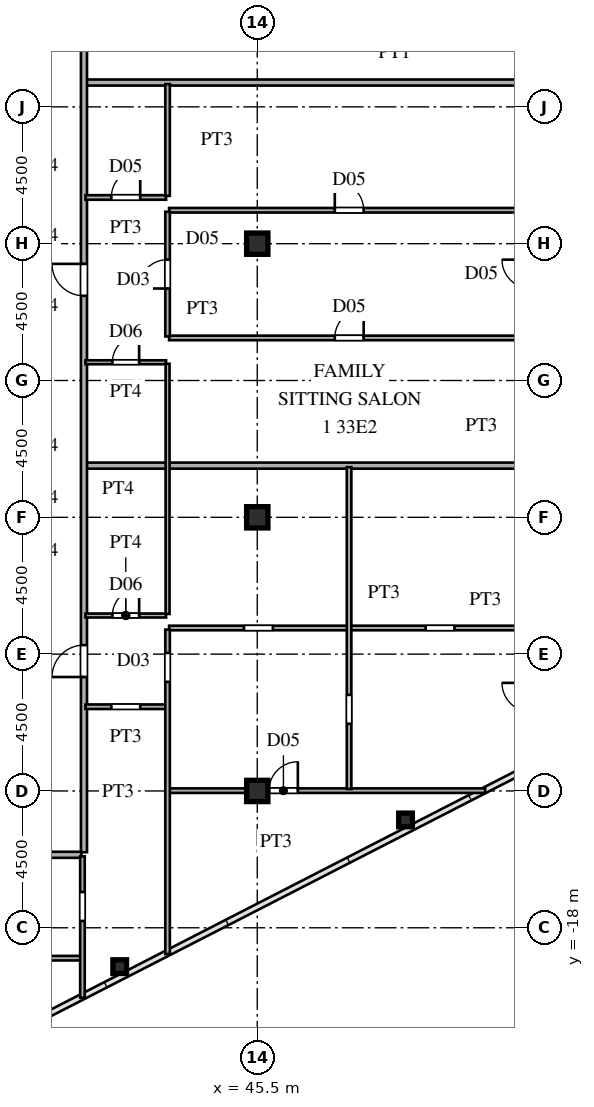
"""IFC4 building model, lengths in metres.
Left out: names, types, materials, properties, quantities, classifications, styles, units other than length and angle.
Written with IfcOpenShell. Run it as: python <this file> out.ifc"""

import sys

from ifc_helpers import new_model, si_unit, direction, frame, frame_2d, origin, origin_2d, place, context, subcontext, project, spatial, rectangle, hollow_rectangle, i_section, extrude, source, transform, mapped, element, fill, save


model = new_model("IFC4")
c1 = context("Model", 3, precision=1e-05, world=origin(), true_north=direction((0.0, 1.0)))
c2 = subcontext(c1, "Body", "Model", "MODEL_VIEW")
j1 = project(units=[si_unit("LENGTHUNIT", "METRE"), si_unit("PLANEANGLEUNIT", "RADIAN")], contexts=[c1])
p1 = place(None, origin())
s1 = spatial("IfcSite", under=j1, at=p1, CompositionType="ELEMENT")
p2 = place(p1, origin())
s2 = spatial("IfcBuilding", under=s1, at=p2, CompositionType="ELEMENT")
p3 = place(p2, frame((0.0, 0.0, 124.8)))
s3 = spatial("IfcBuildingStorey", under=s2, at=p3, CompositionType="ELEMENT", Elevation=124.8)
m1 = source(origin(), c2, "Body", "SweptSolid", [
    extrude(i_section(OverallWidth=0.7, OverallDepth=0.7, WebThickness=0.028, FlangeThickness=0.045, at=origin_2d()), origin(), (0.0, 0.0, 1.0), 3.6),
])
for number, where, z_axis, x_axis in (
    (1, (45.5, -13.5, 0.0), (0.0, 0.0, 1.0), (1.0, 0.0, 0.0)),
    (2, (45.5, -4.5, 0.0), (0.0, 0.0, 1.0), (1.0, 0.0, 0.0)),
    (3, (45.5, 4.5, 0.0), (0.0, 0.0, 1.0), (1.0, 0.0, 0.0)),
):
    element("IfcColumn", number, at=place(p3, frame(where, z_axis=z_axis, x_axis=x_axis)), inside=s3, PredefinedType="COLUMN", context=c2, shape_type="MappedRepresentation", body=[
        mapped(m1, transform((0.0, 0.0, 0.0), scale=1.0)),
    ])
m2 = source(origin(), c2, "Body", "SweptSolid", [
    extrude(hollow_rectangle(XDim=0.45, YDim=0.45, WallThickness=0.018, at=origin_2d()), origin(), (0.0, 0.0, 1.0), 3.6),
])
for number, where, z_axis, x_axis in (
    (4, (40.976, -19.278, 0.0), (0.0, 0.0, 1.0), (1.0, 0.0, 0.0)),
    (5, (50.377, -14.453, 0.0), (0.0, 0.0, 1.0), (1.0, 0.0, 0.0)),
):
    element("IfcColumn", number, at=place(p3, frame(where, z_axis=z_axis, x_axis=x_axis)), inside=s3, PredefinedType="COLUMN", context=c2, shape_type="MappedRepresentation", body=[
        mapped(m2, transform((0.0, 0.0, 0.0), scale=1.0)),
    ])
p4 = place(p3, frame((27.465, -19.0, 0.0), z_axis=(0.0, 0.0, 1.0), x_axis=(1.0, 0.0, 0.0)))
e6 = element("IfcWall", 6, at=p4, inside=s3, PredefinedType="PARTITIONING", context=c2, shape_type="SweptSolid", body=[
    extrude(rectangle(XDim=12.235, YDim=0.15, at=frame_2d((6.117, 0.0))), origin(), (0.0, 0.0, 1.0), 3.38),
])
p5 = place(p4, frame((5.685, 0.0, 0.0)))
e7 = element("IfcOpeningElement", 7, at=p5, cuts=e6, PredefinedType="OPENING", context=c2, shape_type="SweptSolid", body=[
    extrude(rectangle(XDim=0.95, YDim=2.15, at=frame_2d((0.475, 1.075))), frame((0.0, 0.085, 0.0), z_axis=(0.0, -1.0, 0.0), x_axis=(1.0, 0.0, 0.0)), (0.0, 0.0, 1.0), 0.17),
])
p6 = place(p3, frame((36.585, -15.6, 0.0), z_axis=(0.0, 0.0, 1.0), x_axis=(1.0, 0.0, 0.0)))
e8 = element("IfcWall", 8, at=p6, inside=s3, PredefinedType="PARTITIONING", context=c2, shape_type="SweptSolid", body=[
    extrude(rectangle(XDim=3.13, YDim=0.2, at=frame_2d((1.565, 0.0))), origin(), (0.0, 0.0, 1.0), 3.38),
])
p7 = place(p3, frame((42.6, -13.49, 0.0), z_axis=(0.0, 0.0, 1.0), x_axis=(1.0, 0.0, 0.0)))
e9 = element("IfcWall", 9, at=p7, inside=s3, PredefinedType="PARTITIONING", context=c2, shape_type="SweptSolid", body=[
    extrude(rectangle(XDim=10.397, YDim=0.15, at=frame_2d((5.198, 0.0))), origin(), (0.0, 0.0, 1.0), 2.78),
])
p8 = place(p7, frame((3.285, 0.0, 0.0)))
e10 = element("IfcOpeningElement", 10, at=p8, cuts=e9, PredefinedType="OPENING", context=c2, shape_type="SweptSolid", body=[
    extrude(rectangle(XDim=0.95, YDim=2.15, at=frame_2d((0.475, 1.075))), frame((0.0, 0.085, 0.0), z_axis=(0.0, -1.0, 0.0), x_axis=(1.0, 0.0, 0.0)), (0.0, 0.0, 1.0), 0.17),
])
p9 = place(p3, frame((39.85, -10.73, 0.0), z_axis=(0.0, 0.0, 1.0), x_axis=(1.0, 0.0, 0.0)))
e11 = element("IfcWall", 11, at=p9, inside=s3, PredefinedType="PARTITIONING", context=c2, shape_type="SweptSolid", body=[
    extrude(rectangle(XDim=2.65, YDim=0.15, at=frame_2d((1.325, 0.0))), origin(), (0.0, 0.0, 1.0), 3.38),
])
p10 = place(p9, frame((0.85, 0.0, 0.0)))
e12 = element("IfcOpeningElement", 12, at=p10, cuts=e11, PredefinedType="OPENING", context=c2, shape_type="SweptSolid", body=[
    extrude(rectangle(XDim=0.95, YDim=2.15, at=frame_2d((0.475, 1.075))), frame((0.0, 0.085, 0.0), z_axis=(0.0, -1.0, 0.0), x_axis=(1.0, 0.0, 0.0)), (0.0, 0.0, 1.0), 0.17),
])
p11 = place(p3, frame((42.6, -8.14, 0.0), z_axis=(0.0, 0.0, 1.0), x_axis=(1.0, 0.0, 0.0)))
e13 = element("IfcWall", 13, at=p11, inside=s3, PredefinedType="PARTITIONING", context=c2, shape_type="SweptSolid", body=[
    extrude(rectangle(XDim=20.81, YDim=0.15, at=frame_2d((10.405, 0.0))), origin(), (0.0, 0.0, 1.0), 3.38),
])
p12 = place(p11, frame((2.462, 0.0, 0.0)))
e14 = element("IfcOpeningElement", 14, at=p12, cuts=e13, PredefinedType="OPENING", context=c2, shape_type="SweptSolid", body=[
    extrude(rectangle(XDim=0.95, YDim=2.15, at=frame_2d((0.475, 1.075))), frame((0.0, 0.085, 0.0), z_axis=(0.0, -1.0, 0.0), x_axis=(1.0, 0.0, 0.0)), (0.0, 0.0, 1.0), 0.17),
])
p13 = place(p11, frame((8.438, 0.0, 0.0)))
e15 = element("IfcOpeningElement", 15, at=p13, cuts=e13, PredefinedType="OPENING", context=c2, shape_type="SweptSolid", body=[
    extrude(rectangle(XDim=0.95, YDim=2.15, at=frame_2d((0.475, 1.075))), frame((0.0, 0.085, 0.0), z_axis=(0.0, -1.0, 0.0), x_axis=(1.0, 0.0, 0.0)), (0.0, 0.0, 1.0), 0.17),
])
p14 = place(p3, frame((39.85, -7.73, 0.0), z_axis=(0.0, 0.0, 1.0), x_axis=(1.0, 0.0, 0.0)))
e16 = element("IfcWall", 16, at=p14, inside=s3, PredefinedType="PARTITIONING", context=c2, shape_type="SweptSolid", body=[
    extrude(rectangle(XDim=2.65, YDim=0.13, at=frame_2d((1.325, 0.0))), origin(), (0.0, 0.0, 1.0), 3.38),
])
p15 = place(p14, frame((0.885, 0.0, 0.0)))
e17 = element("IfcOpeningElement", 17, at=p15, cuts=e16, PredefinedType="OPENING", context=c2, shape_type="SweptSolid", body=[
    extrude(rectangle(XDim=0.88, YDim=2.1, at=frame_2d((0.44, 1.05))), frame((0.0, 0.075, 0.0), z_axis=(0.0, -1.0, 0.0), x_axis=(1.0, 0.0, 0.0)), (0.0, 0.0, 1.0), 0.15),
])
p16 = place(p3, frame((39.88, -2.8, 0.0), z_axis=(0.0, 0.0, 1.0), x_axis=(1.0, 0.0, 0.0)))
e18 = element("IfcWall", 18, at=p16, inside=s3, PredefinedType="PARTITIONING", context=c2, shape_type="SweptSolid", body=[
    extrude(rectangle(XDim=29.625, YDim=0.2, at=frame_2d((14.812, 0.0))), origin(), (0.0, 0.0, 1.0), 3.38),
])
p17 = place(p3, frame((39.85, 0.6, 0.0), z_axis=(0.0, 0.0, 1.0), x_axis=(1.0, 0.0, 0.0)))
e19 = element("IfcWall", 19, at=p17, inside=s3, PredefinedType="PARTITIONING", context=c2, shape_type="SweptSolid", body=[
    extrude(rectangle(XDim=2.65, YDim=0.13, at=frame_2d((1.325, 0.0))), origin(), (0.0, 0.0, 1.0), 3.38),
])
p18 = place(p17, frame((0.885, 0.0, 0.0)))
e20 = element("IfcOpeningElement", 20, at=p18, cuts=e19, PredefinedType="OPENING", context=c2, shape_type="SweptSolid", body=[
    extrude(rectangle(XDim=0.88, YDim=2.1, at=frame_2d((0.44, 1.05))), frame((0.0, 0.075, 0.0), z_axis=(0.0, -1.0, 0.0), x_axis=(1.0, 0.0, 0.0)), (0.0, 0.0, 1.0), 0.15),
])
p19 = place(p3, frame((42.6, 1.4, 0.0), z_axis=(0.0, 0.0, 1.0), x_axis=(1.0, 0.0, 0.0)))
e21 = element("IfcWall", 21, at=p19, inside=s3, PredefinedType="PARTITIONING", context=c2, shape_type="SweptSolid", body=[
    extrude(rectangle(XDim=26.935, YDim=0.15, at=frame_2d((13.467, 0.0))), origin(), (0.0, 0.0, 1.0), 3.38),
])
p20 = place(p19, frame((5.45, 0.0, 0.0)))
e22 = element("IfcOpeningElement", 22, at=p20, cuts=e21, PredefinedType="OPENING", context=c2, shape_type="SweptSolid", body=[
    extrude(rectangle(XDim=0.95, YDim=2.15, at=frame_2d((0.475, 1.075))), frame((0.0, 0.085, 0.0), z_axis=(0.0, -1.0, 0.0), x_axis=(1.0, 0.0, 0.0)), (0.0, 0.0, 1.0), 0.17),
])
p21 = place(p19, frame((14.275, 0.0, 0.0)))
e23 = element("IfcOpeningElement", 23, at=p21, cuts=e21, PredefinedType="OPENING", context=c2, shape_type="SweptSolid", body=[
    extrude(rectangle(XDim=0.95, YDim=2.15, at=frame_2d((0.475, 1.075))), frame((0.0, 0.085, 0.0), z_axis=(0.0, -1.0, 0.0), x_axis=(1.0, 0.0, 0.0)), (0.0, 0.0, 1.0), 0.17),
])
p22 = place(p3, frame((42.6, 5.6, 0.0), z_axis=(0.0, 0.0, 1.0), x_axis=(1.0, 0.0, 0.0)))
e24 = element("IfcWall", 24, at=p22, inside=s3, PredefinedType="PARTITIONING", context=c2, shape_type="SweptSolid", body=[
    extrude(rectangle(XDim=25.766, YDim=0.15, at=frame_2d((12.883, 0.0))), origin(), (0.0, 0.0, 1.0), 3.38),
])
p23 = place(p22, frame((5.45, 0.0, 0.0)))
e25 = element("IfcOpeningElement", 25, at=p23, cuts=e24, PredefinedType="OPENING", context=c2, shape_type="SweptSolid", body=[
    extrude(rectangle(XDim=0.95, YDim=2.15, at=frame_2d((0.475, 1.075))), frame((0.0, 0.085, 0.0), z_axis=(0.0, -1.0, 0.0), x_axis=(1.0, 0.0, 0.0)), (0.0, 0.0, 1.0), 0.17),
])
p24 = place(p22, frame((14.275, 0.0, 0.0)))
e26 = element("IfcOpeningElement", 26, at=p24, cuts=e24, PredefinedType="OPENING", context=c2, shape_type="SweptSolid", body=[
    extrude(rectangle(XDim=0.95, YDim=2.15, at=frame_2d((0.475, 1.075))), frame((0.0, 0.085, 0.0), z_axis=(0.0, -1.0, 0.0), x_axis=(1.0, 0.0, 0.0)), (0.0, 0.0, 1.0), 0.17),
])
p25 = place(p3, frame((39.85, 6.02, 0.0), z_axis=(0.0, 0.0, 1.0), x_axis=(1.0, 0.0, 0.0)))
e27 = element("IfcWall", 27, at=p25, inside=s3, PredefinedType="PARTITIONING", context=c2, shape_type="SweptSolid", body=[
    extrude(rectangle(XDim=2.65, YDim=0.15, at=frame_2d((1.325, 0.0))), origin(), (0.0, 0.0, 1.0), 3.38),
])
p26 = place(p25, frame((0.85, 0.0, 0.0)))
e28 = element("IfcOpeningElement", 28, at=p26, cuts=e27, PredefinedType="OPENING", context=c2, shape_type="SweptSolid", body=[
    extrude(rectangle(XDim=0.95, YDim=2.15, at=frame_2d((0.475, 1.075))), frame((0.0, 0.085, 0.0), z_axis=(0.0, -1.0, 0.0), x_axis=(1.0, 0.0, 0.0)), (0.0, 0.0, 1.0), 0.17),
])
p27 = place(p3, frame((39.88, 9.8, 0.0), z_axis=(0.0, 0.0, 1.0), x_axis=(1.0, 0.0, 0.0)))
e29 = element("IfcWall", 29, at=p27, inside=s3, PredefinedType="PARTITIONING", context=c2, shape_type="SweptSolid", body=[
    extrude(rectangle(XDim=20.277, YDim=0.2, at=frame_2d((10.139, 0.0))), origin(), (0.0, 0.0, 1.0), 3.38),
])
p28 = place(p3, frame((39.75, -20.301, 0.0), z_axis=(0.0, 0.0, 1.0), x_axis=(0.0, 1.0, 0.0)))
e30 = element("IfcWall", 30, at=p28, inside=s3, PredefinedType="PARTITIONING", context=c2, shape_type="SweptSolid", body=[
    extrude(rectangle(XDim=4.651, YDim=0.15, at=frame_2d((2.326, 0.0))), origin(), (0.0, 0.0, 1.0), 3.38),
])
p29 = place(p28, frame((2.526, 0.0, 0.0)))
e31 = element("IfcOpeningElement", 31, at=p29, cuts=e30, PredefinedType="OPENING", context=c2, shape_type="SweptSolid", body=[
    extrude(rectangle(XDim=0.95, YDim=2.15, at=frame_2d((0.475, 1.075))), frame((0.0, 0.085, 0.0), z_axis=(0.0, -1.0, 0.0), x_axis=(1.0, 0.0, 0.0)), (0.0, 0.0, 1.0), 0.17),
])
p30 = place(p3, frame((39.8, -15.515, 0.0), z_axis=(0.0, 0.0, 1.0), x_axis=(0.0, 1.0, 0.0)))
e32 = element("IfcWall", 32, at=p30, inside=s3, PredefinedType="PARTITIONING", context=c2, shape_type="SweptSolid", body=[
    extrude(rectangle(XDim=31.03, YDim=0.2, at=frame_2d((15.515, 0.0))), origin(), (0.0, 0.0, 1.0), 3.38),
])
p31 = place(p30, frame((5.762, 0.0, 0.0)))
e33 = element("IfcOpeningElement", 33, at=p31, cuts=e32, PredefinedType="OPENING", context=c2, shape_type="SweptSolid", body=[
    extrude(rectangle(XDim=1.05, YDim=2.25, at=frame_2d((0.525, 1.125))), frame((0.0, 0.11, 0.0), z_axis=(0.0, -1.0, 0.0), x_axis=(1.0, 0.0, 0.0)), (0.0, 0.0, 1.0), 0.22),
])
p32 = place(p30, frame((18.301, 0.0, 0.0)))
e34 = element("IfcOpeningElement", 34, at=p32, cuts=e32, PredefinedType="OPENING", context=c2, shape_type="SweptSolid", body=[
    extrude(rectangle(XDim=1.05, YDim=2.25, at=frame_2d((0.525, 1.125))), frame((0.0, 0.11, 0.0), z_axis=(0.0, -1.0, 0.0), x_axis=(1.0, 0.0, 0.0)), (0.0, 0.0, 1.0), 0.22),
])
p33 = place(p30, frame((27.69, 0.0, 0.0)))
e35 = element("IfcOpeningElement", 35, at=p33, cuts=e32, PredefinedType="OPENING", context=c2, shape_type="SweptSolid", body=[
    extrude(rectangle(XDim=1.05, YDim=2.25, at=frame_2d((0.525, 1.125))), frame((0.0, 0.11, 0.0), z_axis=(0.0, -1.0, 0.0), x_axis=(1.0, 0.0, 0.0)), (0.0, 0.0, 1.0), 0.22),
])
p34 = place(p3, frame((42.55, -18.865, 0.0), z_axis=(0.0, 0.0, 1.0), x_axis=(0.0, 1.0, 0.0)))
e36 = element("IfcWall", 36, at=p34, inside=s3, PredefinedType="PARTITIONING", context=c2, shape_type="SweptSolid", body=[
    extrude(rectangle(XDim=10.672, YDim=0.15, at=frame_2d((5.336, 0.0))), origin(), (0.0, 0.0, 1.0), 3.38),
])
p35 = place(p34, frame((8.955, 0.0, 0.0)))
e37 = element("IfcOpeningElement", 37, at=p35, cuts=e36, PredefinedType="OPENING", context=c2, shape_type="SweptSolid", body=[
    extrude(rectangle(XDim=0.95, YDim=2.15, at=frame_2d((0.475, 1.075))), frame((0.0, 0.085, 0.0), z_axis=(0.0, -1.0, 0.0), x_axis=(1.0, 0.0, 0.0)), (0.0, 0.0, 1.0), 0.17),
])
p36 = place(p3, frame((42.55, -7.678, 0.0), z_axis=(0.0, 0.0, 1.0), x_axis=(0.0, 1.0, 0.0)))
e38 = element("IfcWall", 38, at=p36, inside=s3, PredefinedType="PARTITIONING", context=c2, shape_type="SweptSolid", body=[
    extrude(rectangle(XDim=8.228, YDim=0.13, at=frame_2d((4.114, 0.0))), origin(), (0.0, 0.0, 1.0), 3.38),
])
p37 = place(p3, frame((42.55, 1.45, 0.0), z_axis=(0.0, 0.0, 1.0), x_axis=(0.0, 1.0, 0.0)))
e39 = element("IfcWall", 39, at=p37, inside=s3, PredefinedType="PARTITIONING", context=c2, shape_type="SweptSolid", body=[
    extrude(rectangle(XDim=4.1, YDim=0.15, at=frame_2d((2.05, 0.0))), origin(), (0.0, 0.0, 1.0), 3.38),
])
p38 = place(p37, frame((1.575, 0.0, 0.0)))
e40 = element("IfcOpeningElement", 40, at=p38, cuts=e39, PredefinedType="OPENING", context=c2, shape_type="SweptSolid", body=[
    extrude(rectangle(XDim=0.95, YDim=2.15, at=frame_2d((0.475, 1.075))), frame((0.0, 0.085, 0.0), z_axis=(0.0, -1.0, 0.0), x_axis=(1.0, 0.0, 0.0)), (0.0, 0.0, 1.0), 0.17),
])
p39 = place(p3, frame((42.55, 6.072, 0.0), z_axis=(0.0, 0.0, 1.0), x_axis=(0.0, 1.0, 0.0)))
e41 = element("IfcWall", 41, at=p39, inside=s3, PredefinedType="PARTITIONING", context=c2, shape_type="SweptSolid", body=[
    extrude(rectangle(XDim=3.678, YDim=0.15, at=frame_2d((1.839, 0.0))), origin(), (0.0, 0.0, 1.0), 3.38),
])
p40 = place(p3, frame((48.52, -13.436, 0.0), z_axis=(0.0, 0.0, 1.0), x_axis=(0.0, 1.0, 0.0)))
e42 = element("IfcWall", 42, at=p40, inside=s3, PredefinedType="PARTITIONING", context=c2, shape_type="SweptSolid", body=[
    extrude(rectangle(XDim=10.586, YDim=0.15, at=frame_2d((5.293, 0.0))), origin(), (0.0, 0.0, 1.0), 3.38),
])
p41 = place(p40, frame((2.146, 0.0, 0.0)))
e43 = element("IfcOpeningElement", 43, at=p41, cuts=e42, PredefinedType="OPENING", context=c2, shape_type="SweptSolid", body=[
    extrude(rectangle(XDim=0.95, YDim=2.15, at=frame_2d((0.475, 1.075))), frame((0.0, 0.085, 0.0), z_axis=(0.0, -1.0, 0.0), x_axis=(1.0, 0.0, 0.0)), (0.0, 0.0, 1.0), 0.17),
])
m3 = source(origin(), c2, "Body", "SweptSolid", [
    extrude(rectangle(XDim=0.95, YDim=2.15, at=frame_2d((0.475, 1.075))), frame((0.0, 0.025, 0.0), z_axis=(0.0, -1.0, 0.0), x_axis=(1.0, 0.0, 0.0)), (0.0, 0.0, 1.0), 0.05),
])
p42 = place(p8, origin())
e44 = element("IfcDoor", 44, at=p42, inside=s3, OperationType="SINGLE_SWING_RIGHT", PredefinedType="DOOR", context=c2, shape_type="MappedRepresentation", body=[
    mapped(m3, transform((0.0, 0.0, 0.0), scale=1.0)),
])
fill(e10, e44)
m4 = source(origin(), c2, "Body", "SweptSolid", [
    extrude(rectangle(XDim=0.88, YDim=2.1, at=frame_2d((0.44, 1.05))), frame((0.0, 0.025, 0.0), z_axis=(0.0, -1.0, 0.0), x_axis=(1.0, 0.0, 0.0)), (0.0, 0.0, 1.0), 0.05),
])
p43 = place(p15, origin())
e45 = element("IfcDoor", 45, at=p43, inside=s3, OperationType="SINGLE_SWING_RIGHT", PredefinedType="DOOR", context=c2, shape_type="MappedRepresentation", body=[
    mapped(m4, transform((0.0, 0.0, 0.0), scale=1.0)),
])
fill(e17, e45)
p44 = place(p18, origin())
e46 = element("IfcDoor", 46, at=p44, inside=s3, OperationType="SINGLE_SWING_RIGHT", PredefinedType="DOOR", context=c2, shape_type="MappedRepresentation", body=[
    mapped(m4, transform((0.0, 0.0, 0.0), scale=1.0)),
])
fill(e20, e46)
p45 = place(p20, origin())
e47 = element("IfcDoor", 47, at=p45, inside=s3, OperationType="SINGLE_SWING_RIGHT", PredefinedType="DOOR", context=c2, shape_type="MappedRepresentation", body=[
    mapped(m3, transform((0.0, 0.0, 0.0), scale=1.0)),
])
fill(e22, e47)
p46 = place(p23, origin())
e48 = element("IfcDoor", 48, at=p46, inside=s3, OperationType="SINGLE_SWING_LEFT", PredefinedType="DOOR", context=c2, shape_type="MappedRepresentation", body=[
    mapped(m3, transform((0.0, 0.0, 0.0), scale=1.0)),
])
fill(e25, e48)
p47 = place(p26, origin())
e49 = element("IfcDoor", 49, at=p47, inside=s3, OperationType="SINGLE_SWING_RIGHT", PredefinedType="DOOR", context=c2, shape_type="MappedRepresentation", body=[
    mapped(m3, transform((0.0, 0.0, 0.0), scale=1.0)),
])
fill(e28, e49)
m5 = source(origin(), c2, "Body", "SweptSolid", [
    extrude(rectangle(XDim=1.05, YDim=2.25, at=frame_2d((0.525, 1.125))), frame((0.0, 0.025, 0.0), z_axis=(0.0, -1.0, 0.0), x_axis=(1.0, 0.0, 0.0)), (0.0, 0.0, 1.0), 0.05),
])
p48 = place(p31, origin())
e50 = element("IfcDoor", 50, at=p48, inside=s3, OperationType="SINGLE_SWING_LEFT", PredefinedType="DOOR", context=c2, shape_type="MappedRepresentation", body=[
    mapped(m5, transform((0.0, 0.0, 0.0), scale=1.0)),
])
fill(e33, e50)
p49 = place(p32, origin())
e51 = element("IfcDoor", 51, at=p49, inside=s3, OperationType="SINGLE_SWING_RIGHT", PredefinedType="DOOR", context=c2, shape_type="MappedRepresentation", body=[
    mapped(m5, transform((0.0, 0.0, 0.0), scale=1.0)),
])
fill(e34, e51)
p50 = place(p38, origin())
e52 = element("IfcDoor", 52, at=p50, inside=s3, OperationType="SINGLE_SWING_LEFT", PredefinedType="DOOR", context=c2, shape_type="MappedRepresentation", body=[
    mapped(m3, transform((0.0, 0.0, 0.0), scale=1.0)),
])
fill(e40, e52)
save(model, sys.argv[1])
